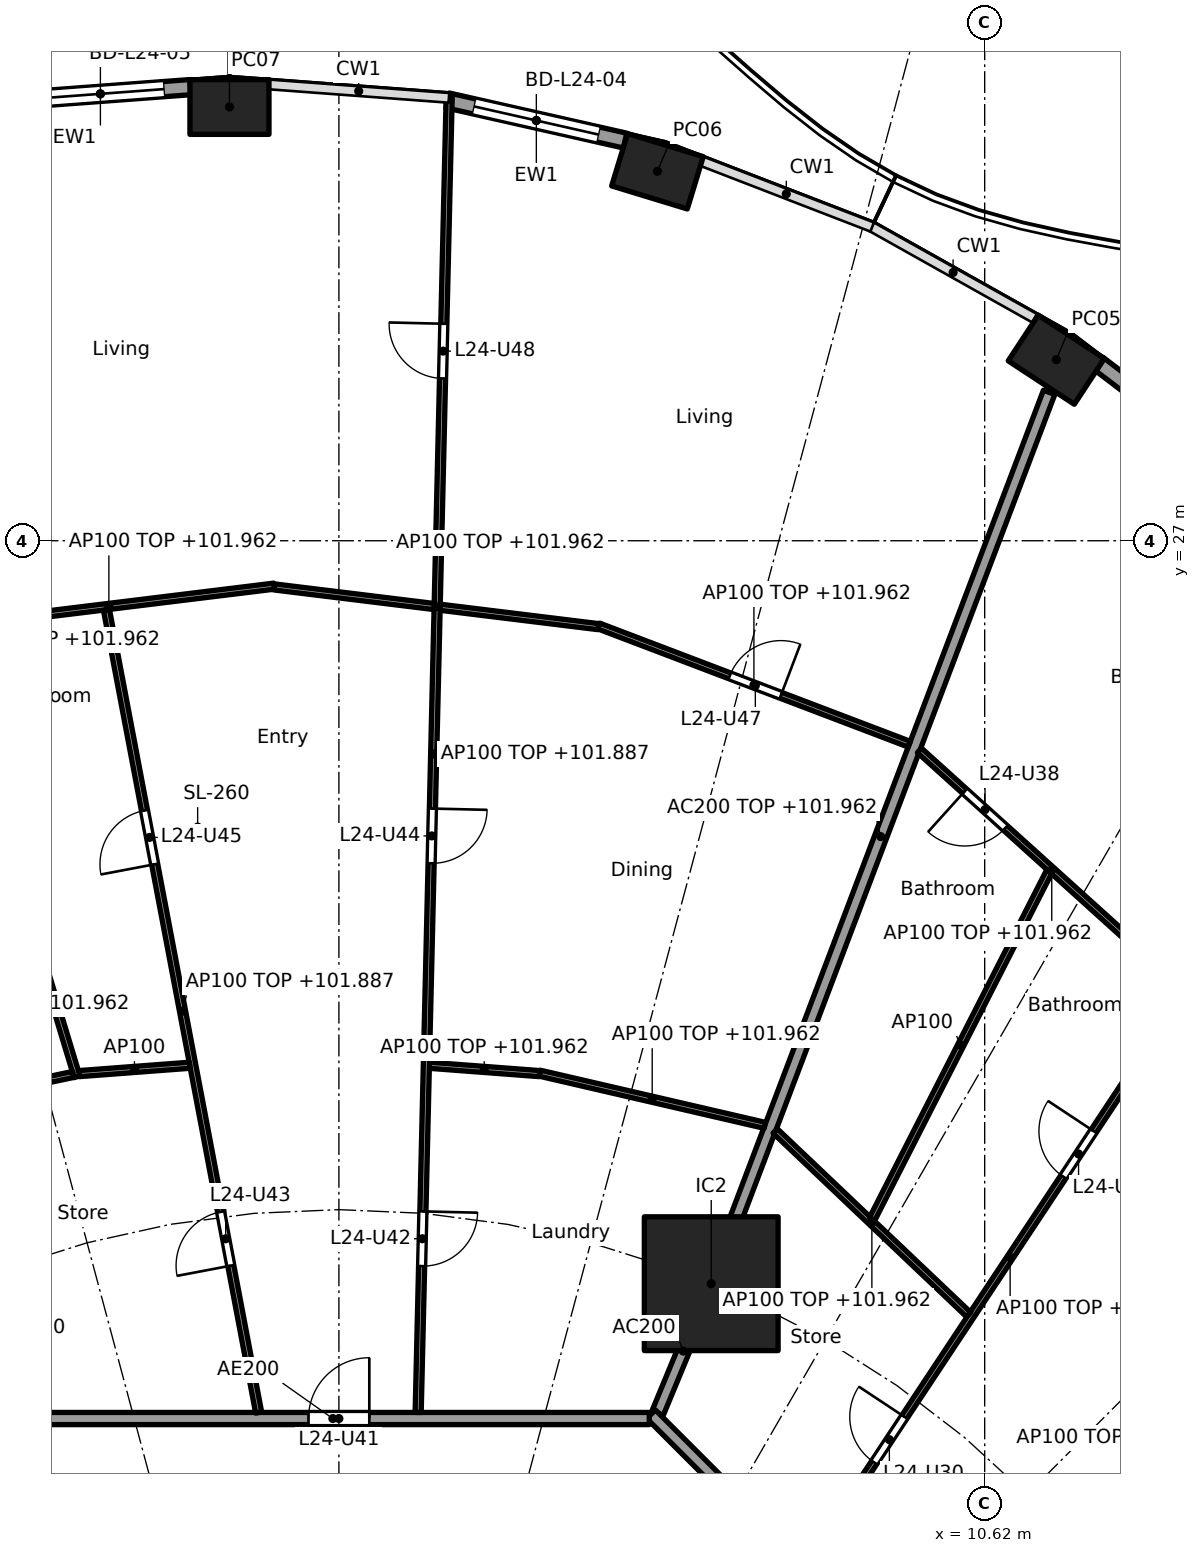
"""IFC4 building model, lengths in metres.
Left out: names, types, materials, properties, quantities, classifications, styles, units other than length and angle.
Written with IfcOpenShell. Run it as: python <this file> out.ifc"""

import sys

from ifc_helpers import new_model, si_unit, direction, frame, frame_2d, origin, origin_2d, place, context, subcontext, project, spatial, rectangle, hollow_rectangle, extrude, element, fill, save


model = new_model("IFC4")
c1 = context("Model", 3, precision=1e-05, world=origin(), true_north=direction((0.0, 1.0)))
c2 = subcontext(c1, "Body", "Model", "MODEL_VIEW")
j1 = project(units=[si_unit("LENGTHUNIT", "METRE"), si_unit("PLANEANGLEUNIT", "RADIAN")], contexts=[c1])
p1 = place(None, origin())
s1 = spatial("IfcSite", under=j1, at=p1, CompositionType="ELEMENT")
p2 = place(p1, origin())
s2 = spatial("IfcBuilding", under=s1, at=p2, CompositionType="ELEMENT")
p3 = place(p2, frame((0.0, 0.0, 99.2)))
s3 = spatial("IfcBuildingStorey", under=s2, at=p3, CompositionType="ELEMENT", Elevation=99.2)
for number, where, z_axis, x_axis in (
    (1, (11.798, 29.978, 0.0), (0.0, 0.0, 1.0), (-0.836, 0.549, 0.0)),
    (2, (5.239, 33.076, 0.0), (0.0, 0.0, 1.0), (-0.957, 0.292, 0.0)),
    (3, (-1.8, 34.133, 0.0), (0.0, 0.0, 1.0), (-1.0, 0.0, 0.0)),
):
    element("IfcColumn", number, at=place(p3, frame(where, z_axis=z_axis, x_axis=x_axis)), inside=s3, PredefinedType="COLUMN", context=c2, shape_type="SweptSolid", body=[
        extrude(hollow_rectangle(XDim=1.3, YDim=0.9, WallThickness=0.045, at=origin_2d()), origin(), (0.0, 0.0, 1.0), 3.7),
    ])
p4 = place(p3, frame((6.123, 14.782, 0.0), z_axis=(0.0, 0.0, 1.0), x_axis=(1.0, 0.0, 0.0)))
e4 = element("IfcColumn", 4, at=p4, inside=s3, PredefinedType="COLUMN", context=c2, shape_type="SweptSolid", body=[
    extrude(rectangle(XDim=2.2, YDim=2.2, at=origin_2d()), origin(), (0.0, 0.0, 1.0), 3.7),
])
p5 = place(p3, frame((12.489, 29.917, 0.0), z_axis=(0.0, 0.0, 1.0), x_axis=(0.796037575978, -0.605247203736, 0.0)))
e5 = element("IfcWall", 5, at=p5, inside=s3, PredefinedType="SOLIDWALL", context=c2, shape_type="SweptSolid", body=[
    extrude(rectangle(XDim=3.134, YDim=0.25, at=frame_2d((1.567, 0.0))), origin(), (0.0, 0.0, 1.0), 3.44),
])
p6 = place(p5, frame((0.517, 0.0, 0.0)))
e6 = element("IfcOpeningElement", 6, at=p6, cuts=e5, PredefinedType="OPENING", context=c2, shape_type="SweptSolid", body=[
    extrude(rectangle(XDim=2.1, YDim=2.4, at=frame_2d((1.05, 1.2))), frame((0.0, 0.135, 0.0), z_axis=(0.0, -1.0, 0.0), x_axis=(1.0, 0.0, 0.0)), (0.0, 0.0, 1.0), 0.27),
])
p7 = place(p3, frame((1.787, 34.241, 0.0), z_axis=(0.0, 0.0, 1.0), x_axis=(0.975317607872, -0.220806620767, 0.0)))
e7 = element("IfcWall", 7, at=p7, inside=s3, PredefinedType="SOLIDWALL", context=c2, shape_type="SweptSolid", body=[
    extrude(rectangle(XDim=2.993, YDim=0.25, at=frame_2d((1.497, 0.0))), origin(), (0.0, 0.0, 1.0), 3.44),
])
p8 = place(p7, frame((0.447, 0.0, 0.0)))
e8 = element("IfcOpeningElement", 8, at=p8, cuts=e7, PredefinedType="OPENING", context=c2, shape_type="SweptSolid", body=[
    extrude(rectangle(XDim=2.1, YDim=2.4, at=frame_2d((1.05, 1.2))), frame((0.0, 0.135, 0.0), z_axis=(0.0, -1.0, 0.0), x_axis=(1.0, 0.0, 0.0)), (0.0, 0.0, 1.0), 0.27),
])
p9 = place(p3, frame((-5.406, 34.239, 0.0), z_axis=(0.0, 0.0, 1.0), x_axis=(0.997231808538, 0.074355363224, 0.0)))
e9 = element("IfcWall", 9, at=p9, inside=s3, PredefinedType="SOLIDWALL", context=c2, shape_type="SweptSolid", body=[
    extrude(rectangle(XDim=2.975, YDim=0.25, at=frame_2d((1.487, 0.0))), origin(), (0.0, 0.0, 1.0), 3.44),
])
p10 = place(p9, frame((0.438, 0.0, 0.0)))
e10 = element("IfcOpeningElement", 10, at=p10, cuts=e9, PredefinedType="OPENING", context=c2, shape_type="SweptSolid", body=[
    extrude(rectangle(XDim=2.1, YDim=2.4, at=frame_2d((1.05, 1.2))), frame((0.0, 0.135, 0.0), z_axis=(0.0, -1.0, 0.0), x_axis=(1.0, 0.0, 0.0)), (0.0, 0.0, 1.0), 0.27),
])
p11 = place(p3, frame((5.243, 12.657, 0.0), z_axis=(0.0, 0.0, 1.0), x_axis=(0.382724096228, 0.923862687939, 0.0)))
e11 = element("IfcWall", 11, at=p11, inside=s3, PredefinedType="PARTITIONING", context=c2, shape_type="SweptSolid", body=[
    extrude(rectangle(XDim=2.201, YDim=0.2, at=frame_2d((1.1, 0.0))), origin(), (0.0, 0.0, 1.0), 3.44),
])
p12 = place(p3, frame((6.141, 14.829, 0.0), z_axis=(0.0, 0.0, 1.0), x_axis=(0.354477134193, 0.935064682968, 0.0)))
e12 = element("IfcWall", 12, at=p12, inside=s3, PredefinedType="PARTITIONING", context=c2, shape_type="SweptSolid", body=[
    extrude(rectangle(XDim=15.626, YDim=0.2, at=frame_2d((7.813, 0.0))), origin(), (0.0, 0.0, 1.0), 2.762),
])
p13 = place(p3, frame((12.635, 5.134, 0.0), z_axis=(0.0, 0.0, 1.0), x_axis=(-0.707106781187, 0.707106781187, 0.0)))
e13 = element("IfcWall", 13, at=p13, inside=s3, PredefinedType="PARTITIONING", context=c2, shape_type="SweptSolid", body=[
    extrude(rectangle(XDim=10.609, YDim=0.2, at=frame_2d((5.305, 0.0))), origin(), (0.0, 0.0, 1.0), 3.44),
])
p14 = place(p13, frame((4.804, 0.0, 0.0)))
e14 = element("IfcOpeningElement", 14, at=p14, cuts=e13, PredefinedType="OPENING", context=c2, shape_type="SweptSolid", body=[
    extrude(rectangle(XDim=1.0, YDim=2.1, at=frame_2d((0.5, 1.05))), frame((0.0, 0.11, 0.0), z_axis=(0.0, -1.0, 0.0), x_axis=(1.0, 0.0, 0.0)), (0.0, 0.0, 1.0), 0.22),
])
p15 = place(p3, frame((5.104, 12.565, 0.0), z_axis=(0.0, 0.0, 1.0), x_axis=(-1.0, 0.0, 0.0)))
e15 = element("IfcWall", 15, at=p15, inside=s3, PredefinedType="PARTITIONING", context=c2, shape_type="SweptSolid", body=[
    extrude(rectangle(XDim=10.409, YDim=0.2, at=frame_2d((5.205, 0.0))), origin(), (0.0, 0.0, 1.0), 3.44),
])
p16 = place(p15, frame((4.604, 0.0, 0.0)))
e16 = element("IfcOpeningElement", 16, at=p16, cuts=e15, PredefinedType="OPENING", context=c2, shape_type="SweptSolid", body=[
    extrude(rectangle(XDim=1.0, YDim=2.1, at=frame_2d((0.5, 1.05))), frame((0.0, 0.11, 0.0), z_axis=(0.0, -1.0, 0.0), x_axis=(1.0, 0.0, 0.0)), (0.0, 0.0, 1.0), 0.22),
])
p17 = place(p3, frame((10.185, 7.726, 0.0), z_axis=(0.0, 0.0, 1.0), x_axis=(0.732598472978, 0.680661059112, 0.0)))
e17 = element("IfcWall", 17, at=p17, inside=s3, PredefinedType="PARTITIONING", context=c2, shape_type="SweptSolid", body=[
    extrude(rectangle(XDim=10.167, YDim=0.1, at=frame_2d((5.084, 0.0))), origin(), (0.0, 0.0, 1.0), 2.687),
])
p18 = place(p17, frame((1.725, 0.0, 0.0)))
e18 = element("IfcOpeningElement", 18, at=p18, cuts=e17, PredefinedType="OPENING", context=c2, shape_type="SweptSolid", body=[
    extrude(rectangle(XDim=0.9, YDim=2.1, at=frame_2d((0.45, 1.05))), frame((0.0, 0.06, 0.0), z_axis=(0.0, -1.0, 0.0), x_axis=(1.0, 0.0, 0.0)), (0.0, 0.0, 1.0), 0.12),
])
p19 = place(p17, frame((6.784, 0.0, 0.0)))
e19 = element("IfcOpeningElement", 19, at=p19, cuts=e17, PredefinedType="OPENING", context=c2, shape_type="SweptSolid", body=[
    extrude(rectangle(XDim=0.9, YDim=2.1, at=frame_2d((0.45, 1.05))), frame((0.0, 0.06, 0.0), z_axis=(0.0, -1.0, 0.0), x_axis=(1.0, 0.0, 0.0)), (0.0, 0.0, 1.0), 0.12),
])
p20 = place(p3, frame((7.713, 10.195, 0.0), z_axis=(0.0, 0.0, 1.0), x_axis=(0.552111071171, 0.833770571015, 0.0)))
e20 = element("IfcWall", 20, at=p20, inside=s3, PredefinedType="PARTITIONING", context=c2, shape_type="SweptSolid", body=[
    extrude(rectangle(XDim=17.208, YDim=0.1, at=frame_2d((8.604, 0.0))), origin(), (0.0, 0.0, 1.0), 2.687),
])
p21 = place(p20, frame((1.976, 0.0, 0.0)))
e21 = element("IfcOpeningElement", 21, at=p21, cuts=e20, PredefinedType="OPENING", context=c2, shape_type="SweptSolid", body=[
    extrude(rectangle(XDim=0.9, YDim=2.1, at=frame_2d((0.45, 1.05))), frame((0.0, 0.06, 0.0), z_axis=(0.0, -1.0, 0.0), x_axis=(1.0, 0.0, 0.0)), (0.0, 0.0, 1.0), 0.12),
])
p22 = place(p20, frame((7.611, 0.0, 0.0)))
e22 = element("IfcOpeningElement", 22, at=p22, cuts=e20, PredefinedType="OPENING", context=c2, shape_type="SweptSolid", body=[
    extrude(rectangle(XDim=0.9, YDim=2.1, at=frame_2d((0.45, 1.05))), frame((0.0, 0.06, 0.0), z_axis=(0.0, -1.0, 0.0), x_axis=(1.0, 0.0, 0.0)), (0.0, 0.0, 1.0), 0.12),
])
p23 = place(p20, frame((13.79, 0.0, 0.0)))
e23 = element("IfcOpeningElement", 23, at=p23, cuts=e20, PredefinedType="OPENING", context=c2, shape_type="SweptSolid", body=[
    extrude(rectangle(XDim=0.9, YDim=2.1, at=frame_2d((0.45, 1.05))), frame((0.0, 0.06, 0.0), z_axis=(0.0, -1.0, 0.0), x_axis=(1.0, 0.0, 0.0)), (0.0, 0.0, 1.0), 0.12),
])
p24 = place(p3, frame((10.355, 14.274, 0.0), z_axis=(0.0, 0.0, 1.0), x_axis=(-0.725206433622, 0.688531501555, 0.0)))
e24 = element("IfcWall", 24, at=p24, inside=s3, PredefinedType="PARTITIONING", context=c2, shape_type="SweptSolid", body=[
    extrude(rectangle(XDim=4.387, YDim=0.1, at=frame_2d((2.193, 0.0))), origin(), (0.0, 0.0, 1.0), 2.762),
])
p25 = place(p3, frame((13.898, 19.625, 0.0), z_axis=(0.0, 0.0, 1.0), x_axis=(-0.742396654702, 0.669960601146, 0.0)))
e25 = element("IfcWall", 25, at=p25, inside=s3, PredefinedType="PARTITIONING", context=c2, shape_type="SweptSolid", body=[
    extrude(rectangle(XDim=5.861, YDim=0.1, at=frame_2d((2.931, 0.0))), origin(), (0.0, 0.0, 1.0), 2.762),
])
p26 = place(p25, frame((3.958, 0.0, 0.0)))
e26 = element("IfcOpeningElement", 26, at=p26, cuts=e25, PredefinedType="OPENING", context=c2, shape_type="SweptSolid", body=[
    extrude(rectangle(XDim=0.9, YDim=2.1, at=frame_2d((0.45, 1.05))), frame((0.0, 0.06, 0.0), z_axis=(0.0, -1.0, 0.0), x_axis=(1.0, 0.0, 0.0)), (0.0, 0.0, 1.0), 0.12),
])
p27 = place(p3, frame((8.769, 15.846, 0.0), z_axis=(0.0, 0.0, 1.0), x_axis=(0.454067187552, 0.890967445639, 0.0)))
e27 = element("IfcWall", 27, at=p27, inside=s3, PredefinedType="PARTITIONING", context=c2, shape_type="SweptSolid", body=[
    extrude(rectangle(XDim=6.414, YDim=0.1, at=frame_2d((3.207, 0.0))), origin(), (0.0, 0.0, 1.0), 3.44),
])
p28 = place(p3, frame((7.004, 17.386, 0.0), z_axis=(0.0, 0.0, 1.0), x_axis=(-0.974179728512, 0.225773905837, 0.0)))
e28 = element("IfcWall", 28, at=p28, inside=s3, PredefinedType="PARTITIONING", context=c2, shape_type="SweptSolid", body=[
    extrude(rectangle(XDim=3.802, YDim=0.1, at=frame_2d((1.901, 0.0))), origin(), (0.0, 0.0, 1.0), 2.762),
])
p29 = place(p3, frame((9.379, 23.655, 0.0), z_axis=(0.0, 0.0, 1.0), x_axis=(-0.934609369022, 0.355675873986, 0.0)))
e29 = element("IfcWall", 29, at=p29, inside=s3, PredefinedType="PARTITIONING", context=c2, shape_type="SweptSolid", body=[
    extrude(rectangle(XDim=5.467, YDim=0.1, at=frame_2d((2.733, 0.0))), origin(), (0.0, 0.0, 1.0), 2.762),
])
p30 = place(p29, frame((2.258, 0.0, 0.0)))
e30 = element("IfcOpeningElement", 30, at=p30, cuts=e29, PredefinedType="OPENING", context=c2, shape_type="SweptSolid", body=[
    extrude(rectangle(XDim=0.9, YDim=2.1, at=frame_2d((0.45, 1.05))), frame((0.0, 0.06, 0.0), z_axis=(0.0, -1.0, 0.0), x_axis=(1.0, 0.0, 0.0)), (0.0, 0.0, 1.0), 0.12),
])
p31 = place(p3, frame((3.299, 18.237, 0.0), z_axis=(0.0, 0.0, 1.0), x_axis=(-0.997152920483, 0.075405922664, 0.0)))
e31 = element("IfcWall", 31, at=p31, inside=s3, PredefinedType="PARTITIONING", context=c2, shape_type="SweptSolid", body=[
    extrude(rectangle(XDim=1.823, YDim=0.1, at=frame_2d((0.911, 0.0))), origin(), (0.0, 0.0, 1.0), 2.762),
])
p32 = place(p3, frame((4.267, 25.587, 0.0), z_axis=(0.0, 0.0, 1.0), x_axis=(-0.992576206119, 0.121624319302, 0.0)))
e32 = element("IfcWall", 32, at=p32, inside=s3, PredefinedType="PARTITIONING", context=c2, shape_type="SweptSolid", body=[
    extrude(rectangle(XDim=5.374, YDim=0.1, at=frame_2d((2.687, 0.0))), origin(), (0.0, 0.0, 1.0), 2.762),
])
p33 = place(p3, frame((1.303, 12.665, 0.0), z_axis=(0.0, 0.0, 1.0), x_axis=(0.023564110689, 0.999722327793, 0.0)))
e33 = element("IfcWall", 33, at=p33, inside=s3, PredefinedType="PARTITIONING", context=c2, shape_type="SweptSolid", body=[
    extrude(rectangle(XDim=21.664, YDim=0.1, at=frame_2d((10.832, 0.0))), origin(), (0.0, 0.0, 1.0), 2.687),
])
p34 = place(p33, frame((2.407, 0.0, 0.0)))
e34 = element("IfcOpeningElement", 34, at=p34, cuts=e33, PredefinedType="OPENING", context=c2, shape_type="SweptSolid", body=[
    extrude(rectangle(XDim=0.9, YDim=2.1, at=frame_2d((0.45, 1.05))), frame((0.0, 0.06, 0.0), z_axis=(0.0, -1.0, 0.0), x_axis=(1.0, 0.0, 0.0)), (0.0, 0.0, 1.0), 0.12),
])
p35 = place(p33, frame((9.034, 0.0, 0.0)))
e35 = element("IfcOpeningElement", 35, at=p35, cuts=e33, PredefinedType="OPENING", context=c2, shape_type="SweptSolid", body=[
    extrude(rectangle(XDim=0.9, YDim=2.1, at=frame_2d((0.45, 1.05))), frame((0.0, 0.06, 0.0), z_axis=(0.0, -1.0, 0.0), x_axis=(1.0, 0.0, 0.0)), (0.0, 0.0, 1.0), 0.12),
])
p36 = place(p33, frame((17.009, 0.0, 0.0)))
e36 = element("IfcOpeningElement", 36, at=p36, cuts=e33, PredefinedType="OPENING", context=c2, shape_type="SweptSolid", body=[
    extrude(rectangle(XDim=0.9, YDim=2.1, at=frame_2d((0.45, 1.05))), frame((0.0, 0.06, 0.0), z_axis=(0.0, -1.0, 0.0), x_axis=(1.0, 0.0, 0.0)), (0.0, 0.0, 1.0), 0.12),
])
p37 = place(p3, frame((-1.066, 26.253, 0.0), z_axis=(0.0, 0.0, 1.0), x_axis=(-0.992574853421, -0.121635358166, 0.0)))
e37 = element("IfcWall", 37, at=p37, inside=s3, PredefinedType="PARTITIONING", context=c2, shape_type="SweptSolid", body=[
    extrude(rectangle(XDim=5.473, YDim=0.1, at=frame_2d((2.737, 0.0))), origin(), (0.0, 0.0, 1.0), 2.762),
])
p38 = place(p3, frame((-1.32, 12.663, 0.0), z_axis=(0.0, 0.0, 1.0), x_axis=(-0.186308855238, 0.982491226658, 0.0)))
e38 = element("IfcWall", 38, at=p38, inside=s3, PredefinedType="PARTITIONING", context=c2, shape_type="SweptSolid", body=[
    extrude(rectangle(XDim=13.437, YDim=0.1, at=frame_2d((6.719, 0.0))), origin(), (0.0, 0.0, 1.0), 2.687),
])
p39 = place(p38, frame((2.458, 0.0, 0.0)))
e39 = element("IfcOpeningElement", 39, at=p39, cuts=e38, PredefinedType="OPENING", context=c2, shape_type="SweptSolid", body=[
    extrude(rectangle(XDim=0.9, YDim=2.1, at=frame_2d((0.45, 1.05))), frame((0.0, 0.06, 0.0), z_axis=(0.0, -1.0, 0.0), x_axis=(1.0, 0.0, 0.0)), (0.0, 0.0, 1.0), 0.12),
])
p40 = place(p38, frame((9.177, 0.0, 0.0)))
e40 = element("IfcOpeningElement", 40, at=p40, cuts=e38, PredefinedType="OPENING", context=c2, shape_type="SweptSolid", body=[
    extrude(rectangle(XDim=0.9, YDim=2.1, at=frame_2d((0.45, 1.05))), frame((0.0, 0.06, 0.0), z_axis=(0.0, -1.0, 0.0), x_axis=(1.0, 0.0, 0.0)), (0.0, 0.0, 1.0), 0.12),
])
p41 = place(p3, frame((-2.453, 18.374, 0.0), z_axis=(0.0, 0.0, 1.0), x_axis=(-0.997153681897, -0.075395853197, 0.0)))
e41 = element("IfcWall", 41, at=p41, inside=s3, PredefinedType="PARTITIONING", context=c2, shape_type="SweptSolid", body=[
    extrude(rectangle(XDim=1.823, YDim=0.1, at=frame_2d((0.912, 0.0))), origin(), (0.0, 0.0, 1.0), 3.44),
])
p42 = place(p3, frame((-4.306, 18.185, 0.0), z_axis=(0.0, 0.0, 1.0), x_axis=(-0.290183838394, 0.956970919064, 0.0)))
e42 = element("IfcWall", 42, at=p42, inside=s3, PredefinedType="PARTITIONING", context=c2, shape_type="SweptSolid", body=[
    extrude(rectangle(XDim=15.015, YDim=0.1, at=frame_2d((7.508, 0.0))), origin(), (0.0, 0.0, 1.0), 2.762),
])
p43 = place(p42, frame((10.922, 0.0, 0.0)))
e43 = element("IfcOpeningElement", 43, at=p43, cuts=e42, PredefinedType="OPENING", context=c2, shape_type="SweptSolid", body=[
    extrude(rectangle(XDim=0.9, YDim=2.1, at=frame_2d((0.45, 1.05))), frame((0.0, 0.06, 0.0), z_axis=(0.0, -1.0, 0.0), x_axis=(1.0, 0.0, 0.0)), (0.0, 0.0, 1.0), 0.12),
])
p44 = place(p3, frame((-4.37, 18.223, 0.0), z_axis=(0.0, 0.0, 1.0), x_axis=(-0.978633053291, -0.205614559323, 0.0)))
e44 = element("IfcWall", 44, at=p44, inside=s3, PredefinedType="PARTITIONING", context=c2, shape_type="SweptSolid", body=[
    extrude(rectangle(XDim=3.387, YDim=0.1, at=frame_2d((1.694, 0.0))), origin(), (0.0, 0.0, 1.0), 2.762),
])
p45 = place(p44, frame((1.244, 0.0, 0.0)))
e45 = element("IfcOpeningElement", 45, at=p45, cuts=e44, PredefinedType="OPENING", context=c2, shape_type="SweptSolid", body=[
    extrude(rectangle(XDim=0.9, YDim=2.1, at=frame_2d((0.45, 1.05))), frame((0.0, 0.06, 0.0), z_axis=(0.0, -1.0, 0.0), x_axis=(1.0, 0.0, 0.0)), (0.0, 0.0, 1.0), 0.12),
])
p46 = place(p8, origin())
e46 = element("IfcDoor", 46, at=p46, inside=s3, OperationType="SLIDING_TO_LEFT", PredefinedType="DOOR", context=c2, shape_type="SweptSolid", body=[
    extrude(rectangle(XDim=2.1, YDim=2.4, at=frame_2d((1.05, 1.2))), frame((0.0, 0.025, 0.0), z_axis=(0.0, -1.0, 0.0), x_axis=(1.0, 0.0, 0.0)), (0.0, 0.0, 1.0), 0.05),
])
fill(e8, e46)
p47 = place(p10, origin())
e47 = element("IfcDoor", 47, at=p47, inside=s3, OperationType="SLIDING_TO_LEFT", PredefinedType="DOOR", context=c2, shape_type="SweptSolid", body=[
    extrude(rectangle(XDim=2.1, YDim=2.4, at=frame_2d((1.05, 1.2))), frame((0.0, 0.025, 0.0), z_axis=(0.0, -1.0, 0.0), x_axis=(1.0, 0.0, 0.0)), (0.0, 0.0, 1.0), 0.05),
])
fill(e10, e47)
p48 = place(p21, origin())
e48 = element("IfcDoor", 48, at=p48, inside=s3, OperationType="SINGLE_SWING_RIGHT", PredefinedType="DOOR", context=c2, shape_type="SweptSolid", body=[
    extrude(rectangle(XDim=0.9, YDim=2.1, at=frame_2d((0.45, 1.05))), frame((0.0, 0.025, 0.0), z_axis=(0.0, -1.0, 0.0), x_axis=(1.0, 0.0, 0.0)), (0.0, 0.0, 1.0), 0.05),
])
fill(e21, e48)
p49 = place(p22, origin())
e49 = element("IfcDoor", 49, at=p49, inside=s3, OperationType="SINGLE_SWING_RIGHT", PredefinedType="DOOR", context=c2, shape_type="SweptSolid", body=[
    extrude(rectangle(XDim=0.9, YDim=2.1, at=frame_2d((0.45, 1.05))), frame((0.0, 0.025, 0.0), z_axis=(0.0, -1.0, 0.0), x_axis=(1.0, 0.0, 0.0)), (0.0, 0.0, 1.0), 0.05),
])
fill(e22, e49)
p50 = place(p26, origin())
e50 = element("IfcDoor", 50, at=p50, inside=s3, OperationType="SINGLE_SWING_RIGHT", PredefinedType="DOOR", context=c2, shape_type="SweptSolid", body=[
    extrude(rectangle(XDim=0.9, YDim=2.1, at=frame_2d((0.45, 1.05))), frame((0.0, 0.025, 0.0), z_axis=(0.0, -1.0, 0.0), x_axis=(1.0, 0.0, 0.0)), (0.0, 0.0, 1.0), 0.05),
])
fill(e26, e50)
p51 = place(p16, frame((1.0, 0.0, 0.0), x_axis=(-1.0, 0.0, 0.0)))
e51 = element("IfcDoor", 51, at=p51, inside=s3, OperationType="SINGLE_SWING_RIGHT", PredefinedType="DOOR", context=c2, shape_type="SweptSolid", body=[
    extrude(rectangle(XDim=1.0, YDim=2.1, at=frame_2d((0.5, 1.05))), frame((0.0, 0.025, 0.0), z_axis=(0.0, -1.0, 0.0), x_axis=(1.0, 0.0, 0.0)), (0.0, 0.0, 1.0), 0.05),
])
fill(e16, e51)
p52 = place(p34, frame((0.9, 0.0, 0.0), x_axis=(-1.0, 0.0, 0.0)))
e52 = element("IfcDoor", 52, at=p52, inside=s3, OperationType="SINGLE_SWING_LEFT", PredefinedType="DOOR", context=c2, shape_type="SweptSolid", body=[
    extrude(rectangle(XDim=0.9, YDim=2.1, at=frame_2d((0.45, 1.05))), frame((0.0, 0.025, 0.0), z_axis=(0.0, -1.0, 0.0), x_axis=(1.0, 0.0, 0.0)), (0.0, 0.0, 1.0), 0.05),
])
fill(e34, e52)
p53 = place(p39, origin())
e53 = element("IfcDoor", 53, at=p53, inside=s3, OperationType="SINGLE_SWING_LEFT", PredefinedType="DOOR", context=c2, shape_type="SweptSolid", body=[
    extrude(rectangle(XDim=0.9, YDim=2.1, at=frame_2d((0.45, 1.05))), frame((0.0, 0.025, 0.0), z_axis=(0.0, -1.0, 0.0), x_axis=(1.0, 0.0, 0.0)), (0.0, 0.0, 1.0), 0.05),
])
fill(e39, e53)
p54 = place(p35, frame((0.9, 0.0, 0.0), x_axis=(-1.0, 0.0, 0.0)))
e54 = element("IfcDoor", 54, at=p54, inside=s3, OperationType="SINGLE_SWING_LEFT", PredefinedType="DOOR", context=c2, shape_type="SweptSolid", body=[
    extrude(rectangle(XDim=0.9, YDim=2.1, at=frame_2d((0.45, 1.05))), frame((0.0, 0.025, 0.0), z_axis=(0.0, -1.0, 0.0), x_axis=(1.0, 0.0, 0.0)), (0.0, 0.0, 1.0), 0.05),
])
fill(e35, e54)
p55 = place(p40, origin())
e55 = element("IfcDoor", 55, at=p55, inside=s3, OperationType="SINGLE_SWING_LEFT", PredefinedType="DOOR", context=c2, shape_type="SweptSolid", body=[
    extrude(rectangle(XDim=0.9, YDim=2.1, at=frame_2d((0.45, 1.05))), frame((0.0, 0.025, 0.0), z_axis=(0.0, -1.0, 0.0), x_axis=(1.0, 0.0, 0.0)), (0.0, 0.0, 1.0), 0.05),
])
fill(e40, e55)
p56 = place(p30, frame((0.9, 0.0, 0.0), x_axis=(-1.0, 0.0, 0.0)))
e56 = element("IfcDoor", 56, at=p56, inside=s3, OperationType="SINGLE_SWING_RIGHT", PredefinedType="DOOR", context=c2, shape_type="SweptSolid", body=[
    extrude(rectangle(XDim=0.9, YDim=2.1, at=frame_2d((0.45, 1.05))), frame((0.0, 0.025, 0.0), z_axis=(0.0, -1.0, 0.0), x_axis=(1.0, 0.0, 0.0)), (0.0, 0.0, 1.0), 0.05),
])
fill(e30, e56)
p57 = place(p36, origin())
e57 = element("IfcDoor", 57, at=p57, inside=s3, OperationType="SINGLE_SWING_RIGHT", PredefinedType="DOOR", context=c2, shape_type="SweptSolid", body=[
    extrude(rectangle(XDim=0.9, YDim=2.1, at=frame_2d((0.45, 1.05))), frame((0.0, 0.025, 0.0), z_axis=(0.0, -1.0, 0.0), x_axis=(1.0, 0.0, 0.0)), (0.0, 0.0, 1.0), 0.05),
])
fill(e36, e57)
save(model, sys.argv[1])
